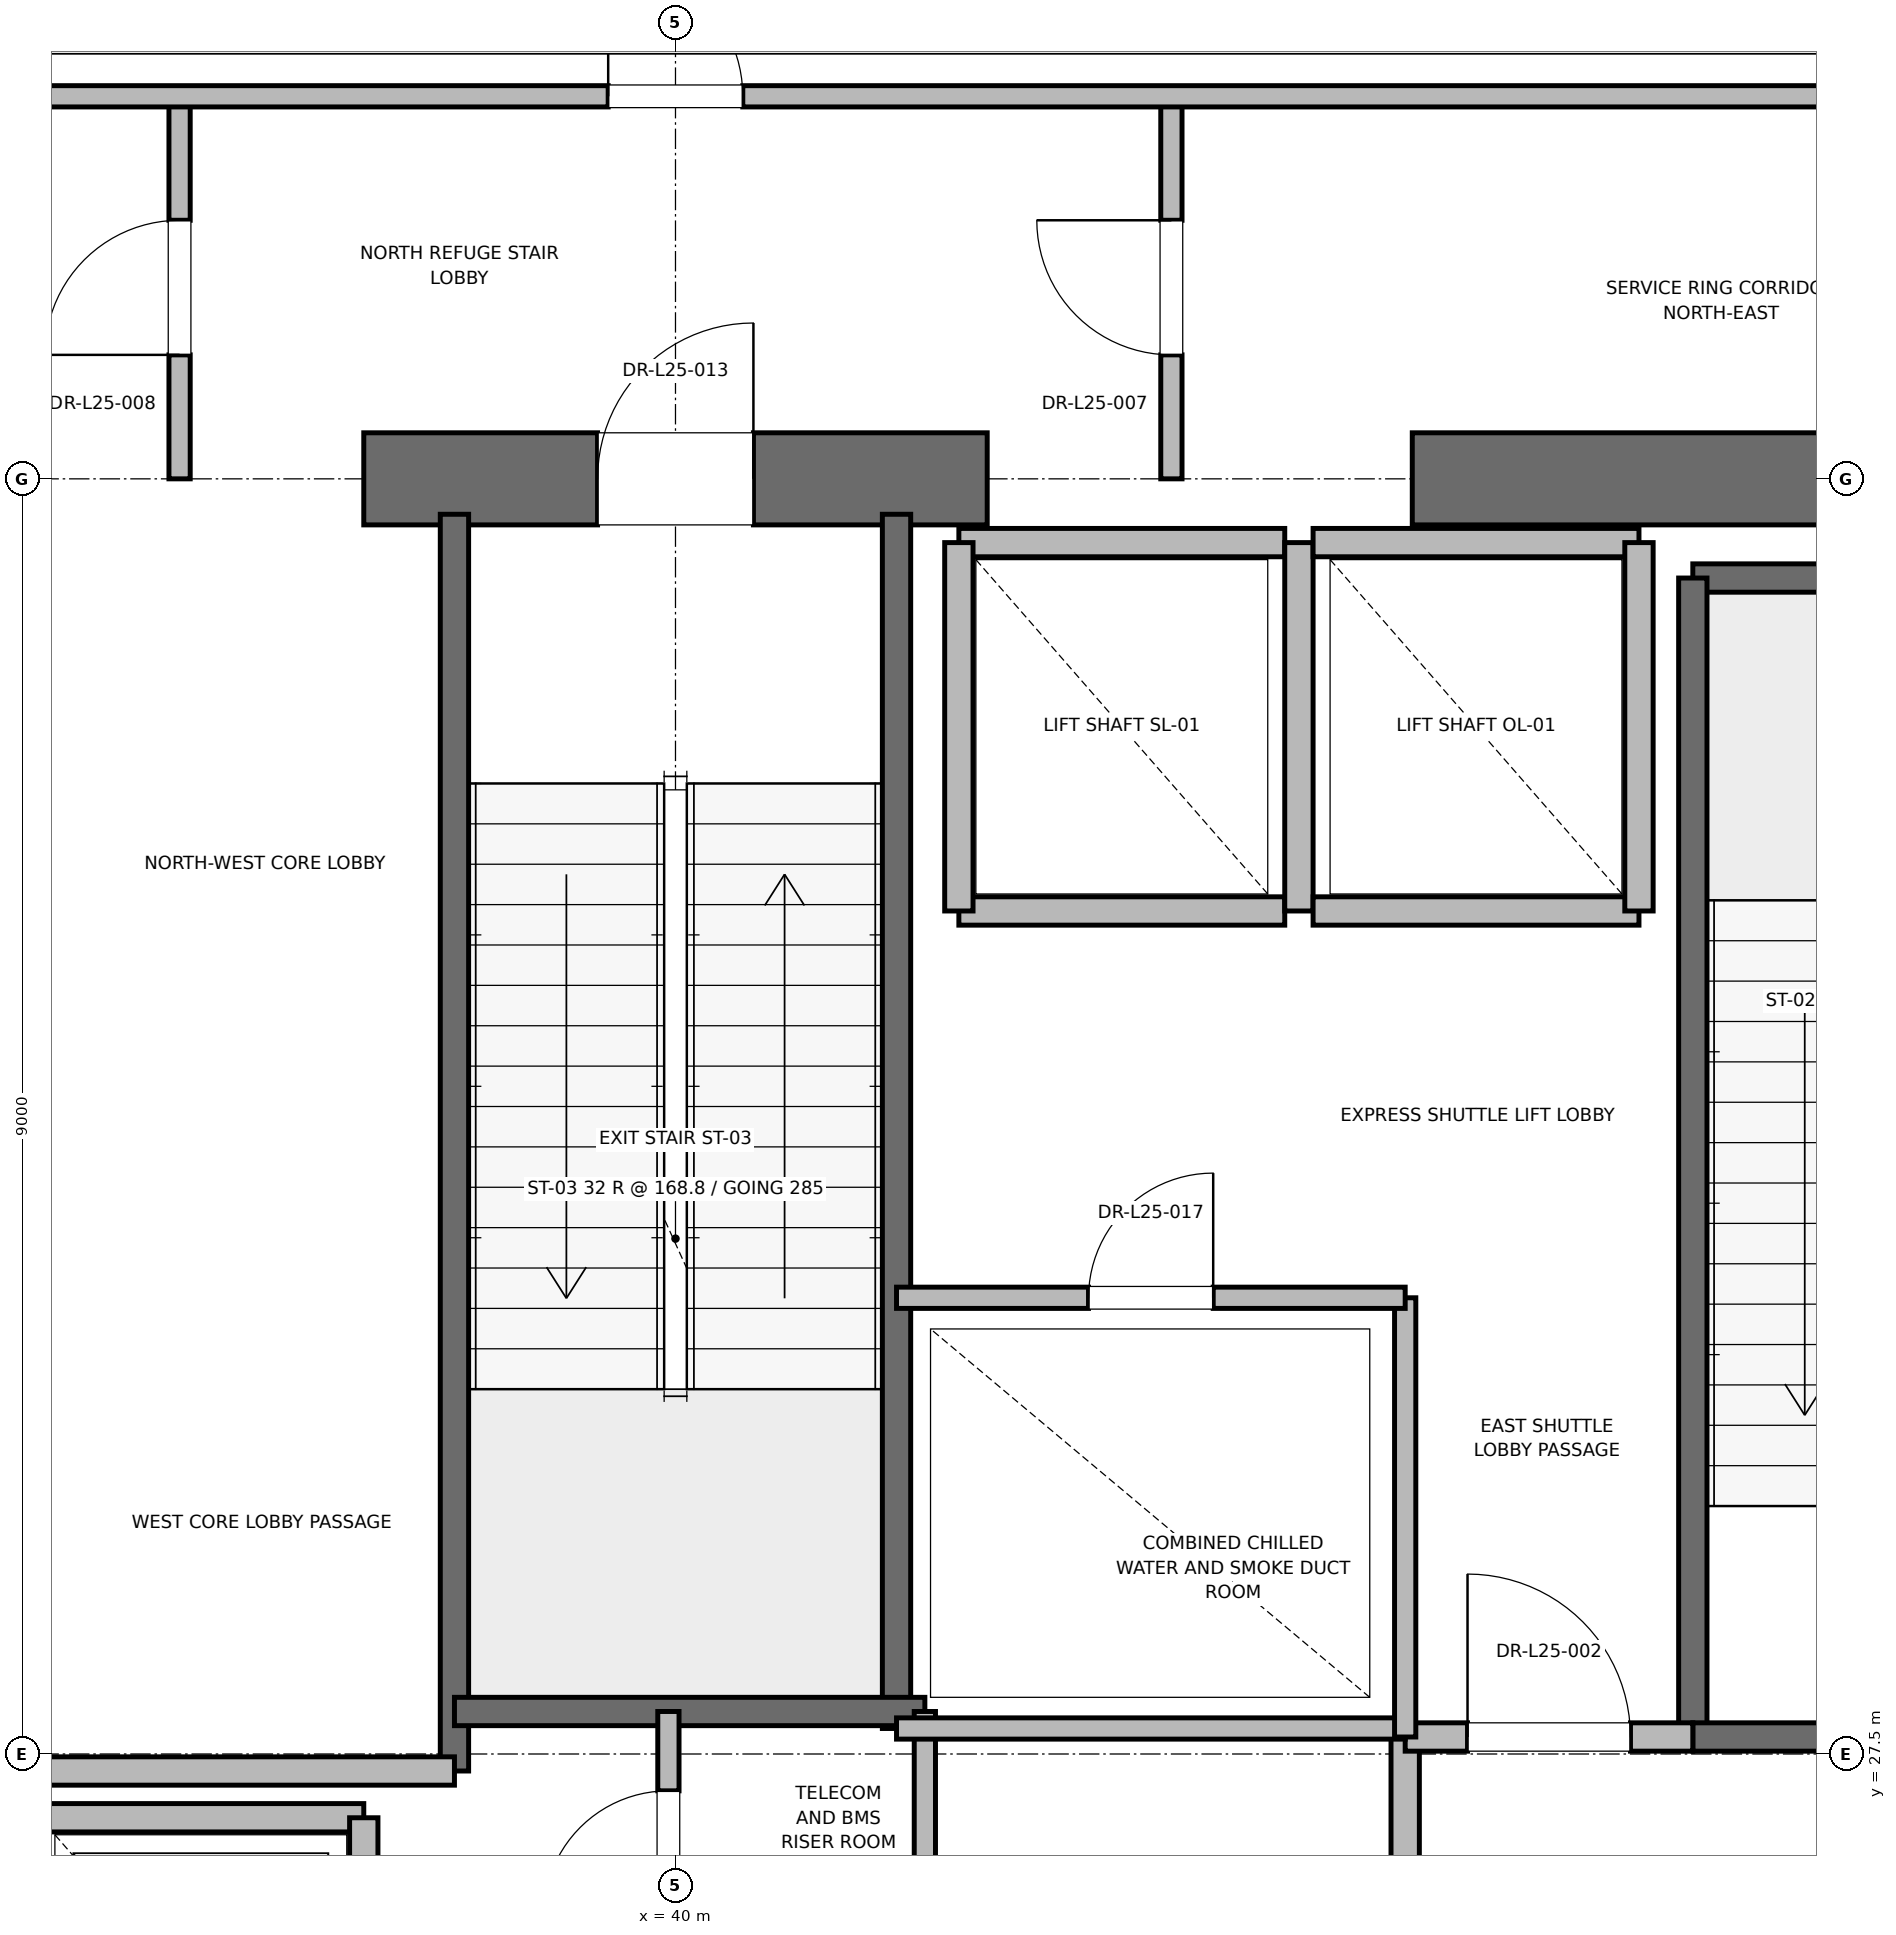
"""IFC4 building model, lengths in metres.
Left out: names, types, materials, properties, quantities, classifications, styles, units other than length and angle.
Written with IfcOpenShell. Run it as: python <this file> out.ifc"""

import sys

from ifc_helpers import new_model, si_unit, direction, frame, frame_2d, origin, place, context, subcontext, project, spatial, rectangle, extrude, element, fill, save


model = new_model("IFC4")
c1 = context("Model", 3, precision=1e-05, world=origin(), true_north=direction((0.0, 1.0)))
c2 = subcontext(c1, "Body", "Model", "MODEL_VIEW")
j1 = project(units=[si_unit("LENGTHUNIT", "METRE"), si_unit("PLANEANGLEUNIT", "RADIAN")], contexts=[c1])
p1 = place(None, origin())
s1 = spatial("IfcSite", under=j1, at=p1, CompositionType="ELEMENT")
p2 = place(p1, origin())
s2 = spatial("IfcBuilding", under=s1, at=p2, CompositionType="ELEMENT")
p3 = place(p2, frame((0.0, 0.0, 107.6)))
s3 = spatial("IfcBuildingStorey", under=s2, at=p3, CompositionType="ELEMENT", Elevation=107.6)
p4 = place(p3, frame((37.8, 36.5, 0.0), z_axis=(0.0, 0.0, 1.0), x_axis=(1.0, 0.0, 0.0)))
e1 = element("IfcWall", 1, at=p4, inside=s3, PredefinedType="SHEAR", context=c2, shape_type="SweptSolid", body=[
    extrude(rectangle(XDim=4.4, YDim=0.65, at=frame_2d((2.2, 0.0))), origin(), (0.0, 0.0, 1.0), 5.1),
])
p5 = place(p4, frame((1.65, 0.0, 0.0)))
e2 = element("IfcOpeningElement", 2, at=p5, cuts=e1, PredefinedType="OPENING", context=c2, shape_type="SweptSolid", body=[
    extrude(rectangle(XDim=1.1, YDim=2.15, at=frame_2d((0.55, 1.075))), frame((0.0, 0.325, 0.0), z_axis=(0.0, -1.0, 0.0), x_axis=(1.0, 0.0, 0.0)), (0.0, 0.0, 1.0), 0.65),
])
p6 = place(p3, frame((45.2, 36.5, 0.0), z_axis=(0.0, 0.0, 1.0), x_axis=(1.0, 0.0, 0.0)))
e3 = element("IfcWall", 3, at=p6, inside=s3, PredefinedType="SHEAR", context=c2, shape_type="SweptSolid", body=[
    extrude(rectangle(XDim=5.8, YDim=0.65, at=frame_2d((2.9, 0.0))), origin(), (0.0, 0.0, 1.0), 5.1),
])
p7 = place(p3, frame((47.18, 35.8, 0.0), z_axis=(0.0, 0.0, 1.0), x_axis=(1.0, 0.0, 0.0)))
e4 = element("IfcWall", 4, at=p7, inside=s3, PredefinedType="SOLIDWALL", context=c2, shape_type="SweptSolid", body=[
    extrude(rectangle(XDim=3.12, YDim=0.2, at=frame_2d((1.56, 0.0))), origin(), (0.0, 0.0, 1.0), 5.1),
])
p8 = place(p3, frame((47.18, 27.62, 0.0), z_axis=(0.0, 0.0, 1.0), x_axis=(0.0, 1.0, 0.0)))
e5 = element("IfcWall", 5, at=p8, inside=s3, PredefinedType="SOLIDWALL", context=c2, shape_type="SweptSolid", body=[
    extrude(rectangle(XDim=8.18, YDim=0.2, at=frame_2d((4.09, 0.0))), origin(), (0.0, 0.0, 1.0), 5.1),
])
p9 = place(p3, frame((47.18, 27.62, 0.0), z_axis=(0.0, 0.0, 1.0), x_axis=(1.0, 0.0, 0.0)))
e6 = element("IfcWall", 6, at=p9, inside=s3, PredefinedType="SOLIDWALL", context=c2, shape_type="SweptSolid", body=[
    extrude(rectangle(XDim=3.12, YDim=0.2, at=frame_2d((1.56, 0.0))), origin(), (0.0, 0.0, 1.0), 5.1),
])
p10 = place(p9, frame((1.01, 0.0, 0.0)))
e7 = element("IfcOpeningElement", 7, at=p10, cuts=e6, PredefinedType="OPENING", context=c2, shape_type="SweptSolid", body=[
    extrude(rectangle(XDim=1.1, YDim=2.15, at=frame_2d((0.55, 1.075))), frame((0.0, 0.1, 0.0), z_axis=(0.0, -1.0, 0.0), x_axis=(1.0, 0.0, 0.0)), (0.0, 0.0, 1.0), 0.2),
])
p11 = place(p3, frame((38.44, 27.38, 0.0), z_axis=(0.0, 0.0, 1.0), x_axis=(0.0, 1.0, 0.0)))
e8 = element("IfcWall", 8, at=p11, inside=s3, PredefinedType="SOLIDWALL", context=c2, shape_type="SweptSolid", body=[
    extrude(rectangle(XDim=8.87, YDim=0.2, at=frame_2d((4.435, 0.0))), origin(), (0.0, 0.0, 1.0), 5.1),
])
p12 = place(p3, frame((41.56, 27.68, 0.0), z_axis=(0.0, 0.0, 1.0), x_axis=(0.0, 1.0, 0.0)))
e9 = element("IfcWall", 9, at=p12, inside=s3, PredefinedType="SOLIDWALL", context=c2, shape_type="SweptSolid", body=[
    extrude(rectangle(XDim=8.57, YDim=0.2, at=frame_2d((4.285, 0.0))), origin(), (0.0, 0.0, 1.0), 5.1),
])
p13 = place(p3, frame((38.44, 27.8, 0.0), z_axis=(0.0, 0.0, 1.0), x_axis=(1.0, 0.0, 0.0)))
e10 = element("IfcWall", 10, at=p13, inside=s3, PredefinedType="SOLIDWALL", context=c2, shape_type="SweptSolid", body=[
    extrude(rectangle(XDim=3.32, YDim=0.2, at=frame_2d((1.66, 0.0))), origin(), (0.0, 0.0, 1.0), 5.1),
])
p14 = place(p3, frame((32.82, 27.38, 0.0), z_axis=(0.0, 0.0, 1.0), x_axis=(1.0, 0.0, 0.0)))
e11 = element("IfcWall", 11, at=p14, inside=s3, PredefinedType="PARTITIONING", context=c2, shape_type="SweptSolid", body=[
    extrude(rectangle(XDim=5.62, YDim=0.2, at=frame_2d((2.81, 0.0))), origin(), (0.0, 0.0, 1.0), 5.1),
])
p15 = place(p3, frame((45.15, 24.25, 0.0), z_axis=(0.0, 0.0, 1.0), x_axis=(0.0, 1.0, 0.0)))
e12 = element("IfcWall", 12, at=p15, inside=s3, PredefinedType="PARTITIONING", context=c2, shape_type="SweptSolid", body=[
    extrude(rectangle(XDim=3.37, YDim=0.2, at=frame_2d((1.685, 0.0))), origin(), (0.0, 0.0, 1.0), 5.1),
])
p16 = place(p3, frame((45.15, 27.62, 0.0), z_axis=(0.0, 0.0, 1.0), x_axis=(1.0, 0.0, 0.0)))
e13 = element("IfcWall", 13, at=p16, inside=s3, PredefinedType="PARTITIONING", context=c2, shape_type="SweptSolid", body=[
    extrude(rectangle(XDim=2.03, YDim=0.2, at=frame_2d((1.015, 0.0))), origin(), (0.0, 0.0, 1.0), 5.1),
])
p17 = place(p16, frame((0.44, 0.0, 0.0)))
e14 = element("IfcOpeningElement", 14, at=p17, cuts=e13, PredefinedType="OPENING", context=c2, shape_type="SweptSolid", body=[
    extrude(rectangle(XDim=1.15, YDim=2.2, at=frame_2d((0.575, 1.1))), frame((0.0, 0.1, 0.0), z_axis=(0.0, -1.0, 0.0), x_axis=(1.0, 0.0, 0.0)), (0.0, 0.0, 1.0), 0.2),
])
p18 = place(p3, frame((37.8, 27.05, 0.0), z_axis=(0.0, 0.0, 1.0), x_axis=(-1.0, 0.0, 0.0)))
e15 = element("IfcWall", 15, at=p18, inside=s3, PredefinedType="SOLIDWALL", context=c2, shape_type="SweptSolid", body=[
    extrude(rectangle(XDim=2.3, YDim=0.2, at=frame_2d((1.15, 0.0))), origin(), (0.0, 0.0, 1.0), 5.1),
])
p19 = place(p3, frame((37.8, 24.45, 0.0), z_axis=(0.0, 0.0, 1.0), x_axis=(0.0, 1.0, 0.0)))
e16 = element("IfcWall", 16, at=p19, inside=s3, PredefinedType="SOLIDWALL", context=c2, shape_type="SweptSolid", body=[
    extrude(rectangle(XDim=2.6, YDim=0.2, at=frame_2d((1.3, 0.0))), origin(), (0.0, 0.0, 1.0), 5.1),
])
p20 = place(p3, frame((42.0, 33.45, 0.0), z_axis=(0.0, 0.0, 1.0), x_axis=(1.0, 0.0, 0.0)))
e17 = element("IfcWall", 17, at=p20, inside=s3, PredefinedType="SOLIDWALL", context=c2, shape_type="SweptSolid", body=[
    extrude(rectangle(XDim=2.3, YDim=0.2, at=frame_2d((1.15, 0.0))), origin(), (0.0, 0.0, 1.0), 5.1),
])
p21 = place(p3, frame((44.3, 36.05, 0.0), z_axis=(0.0, 0.0, 1.0), x_axis=(-1.0, 0.0, 0.0)))
e18 = element("IfcWall", 18, at=p21, inside=s3, PredefinedType="SOLIDWALL", context=c2, shape_type="SweptSolid", body=[
    extrude(rectangle(XDim=2.3, YDim=0.2, at=frame_2d((1.15, 0.0))), origin(), (0.0, 0.0, 1.0), 3.88),
])
for number, where, z_axis, x_axis in (
    (19, (42.0, 36.05, 0.0), (0.0, 0.0, 1.0), (0.0, -1.0, 0.0)),
    (20, (44.4, 33.45, 0.0), (0.0, 0.0, 1.0), (0.0, 1.0, 0.0)),
):
    element("IfcWall", number, at=place(p3, frame(where, z_axis=z_axis, x_axis=x_axis)), inside=s3, PredefinedType="SOLIDWALL", context=c2, shape_type="SweptSolid", body=[
        extrude(rectangle(XDim=2.6, YDim=0.2, at=frame_2d((1.3, 0.0))), origin(), (0.0, 0.0, 1.0), 3.88),
    ])
p22 = place(p3, frame((44.5, 33.45, 0.0), z_axis=(0.0, 0.0, 1.0), x_axis=(1.0, 0.0, 0.0)))
e21 = element("IfcWall", 21, at=p22, inside=s3, PredefinedType="SOLIDWALL", context=c2, shape_type="SweptSolid", body=[
    extrude(rectangle(XDim=2.3, YDim=0.2, at=frame_2d((1.15, 0.0))), origin(), (0.0, 0.0, 1.0), 5.1),
])
p23 = place(p3, frame((46.8, 36.05, 0.0), z_axis=(0.0, 0.0, 1.0), x_axis=(-1.0, 0.0, 0.0)))
e22 = element("IfcWall", 22, at=p23, inside=s3, PredefinedType="SOLIDWALL", context=c2, shape_type="SweptSolid", body=[
    extrude(rectangle(XDim=2.3, YDim=0.2, at=frame_2d((1.15, 0.0))), origin(), (0.0, 0.0, 1.0), 3.88),
])
p24 = place(p3, frame((46.8, 33.45, 0.0), z_axis=(0.0, 0.0, 1.0), x_axis=(0.0, 1.0, 0.0)))
e23 = element("IfcWall", 23, at=p24, inside=s3, PredefinedType="SOLIDWALL", context=c2, shape_type="SweptSolid", body=[
    extrude(rectangle(XDim=2.6, YDim=0.2, at=frame_2d((1.3, 0.0))), origin(), (0.0, 0.0, 1.0), 5.1),
])
p25 = place(p3, frame((41.76, 23.8, 0.0), z_axis=(0.0, 0.0, 1.0), x_axis=(0.0, 1.0, 0.0)))
e24 = element("IfcWall", 24, at=p25, inside=s3, PredefinedType="PARTITIONING", context=c2, shape_type="SweptSolid", body=[
    extrude(rectangle(XDim=4.0, YDim=0.15, at=frame_2d((2.0, 0.0))), origin(), (0.0, 0.0, 1.0), 2.85),
])
p26 = place(p3, frame((39.95, 25.8, 0.0), z_axis=(0.0, 0.0, 1.0), x_axis=(0.0, 1.0, 0.0)))
e25 = element("IfcWall", 25, at=p26, inside=s3, PredefinedType="PARTITIONING", context=c2, shape_type="SweptSolid", body=[
    extrude(rectangle(XDim=2.0, YDim=0.15, at=frame_2d((1.0, 0.0))), origin(), (0.0, 0.0, 1.0), 2.85),
])
p27 = place(p26, frame((0.56, 0.0, 0.0)))
e26 = element("IfcOpeningElement", 26, at=p27, cuts=e25, PredefinedType="OPENING", context=c2, shape_type="SweptSolid", body=[
    extrude(rectangle(XDim=0.88, YDim=2.1, at=frame_2d((0.44, 1.05))), frame((0.0, 0.075, 0.0), z_axis=(0.0, -1.0, 0.0), x_axis=(1.0, 0.0, 0.0)), (0.0, 0.0, 1.0), 0.15),
])
p28 = place(p3, frame((41.56, 27.68, 0.0), z_axis=(0.0, 0.0, 1.0), x_axis=(1.0, 0.0, 0.0)))
e27 = element("IfcWall", 27, at=p28, inside=s3, PredefinedType="PARTITIONING", context=c2, shape_type="SweptSolid", body=[
    extrude(rectangle(XDim=3.59, YDim=0.15, at=frame_2d((1.795, 0.0))), origin(), (0.0, 0.0, 1.0), 2.85),
])
p29 = place(p3, frame((45.15, 27.62, 0.0), z_axis=(0.0, 0.0, 1.0), x_axis=(0.0, 1.0, 0.0)))
e28 = element("IfcWall", 28, at=p29, inside=s3, PredefinedType="PARTITIONING", context=c2, shape_type="SweptSolid", body=[
    extrude(rectangle(XDim=3.1, YDim=0.15, at=frame_2d((1.55, 0.0))), origin(), (0.0, 0.0, 1.0), 2.85),
])
p30 = place(p3, frame((41.56, 30.72, 0.0), z_axis=(0.0, 0.0, 1.0), x_axis=(1.0, 0.0, 0.0)))
e29 = element("IfcWall", 29, at=p30, inside=s3, PredefinedType="PARTITIONING", context=c2, shape_type="SweptSolid", body=[
    extrude(rectangle(XDim=3.59, YDim=0.15, at=frame_2d((1.795, 0.0))), origin(), (0.0, 0.0, 1.0), 2.85),
])
p31 = place(p30, frame((1.355, 0.0, 0.0)))
e30 = element("IfcOpeningElement", 30, at=p31, cuts=e29, PredefinedType="OPENING", context=c2, shape_type="SweptSolid", body=[
    extrude(rectangle(XDim=0.88, YDim=2.1, at=frame_2d((0.44, 1.05))), frame((0.0, 0.075, 0.0), z_axis=(0.0, -1.0, 0.0), x_axis=(1.0, 0.0, 0.0)), (0.0, 0.0, 1.0), 0.15),
])
p32 = place(p3, frame((36.5, 36.5, 0.0), z_axis=(0.0, 0.0, 1.0), x_axis=(0.0, 1.0, 0.0)))
e31 = element("IfcWall", 31, at=p32, inside=s3, PredefinedType="PARTITIONING", context=c2, shape_type="SweptSolid", body=[
    extrude(rectangle(XDim=2.7, YDim=0.15, at=frame_2d((1.35, 0.0))), origin(), (0.0, 0.0, 1.0), 2.85),
])
p33 = place(p32, frame((0.875, 0.0, 0.0)))
e32 = element("IfcOpeningElement", 32, at=p33, cuts=e31, PredefinedType="OPENING", context=c2, shape_type="SweptSolid", body=[
    extrude(rectangle(XDim=0.95, YDim=2.15, at=frame_2d((0.475, 1.075))), frame((0.0, 0.075, 0.0), z_axis=(0.0, -1.0, 0.0), x_axis=(1.0, 0.0, 0.0)), (0.0, 0.0, 1.0), 0.15),
])
p34 = place(p3, frame((43.5, 36.5, 0.0), z_axis=(0.0, 0.0, 1.0), x_axis=(0.0, 1.0, 0.0)))
e33 = element("IfcWall", 33, at=p34, inside=s3, PredefinedType="PARTITIONING", context=c2, shape_type="SweptSolid", body=[
    extrude(rectangle(XDim=2.7, YDim=0.15, at=frame_2d((1.35, 0.0))), origin(), (0.0, 0.0, 1.0), 2.85),
])
p35 = place(p34, frame((0.875, 0.0, 0.0)))
e34 = element("IfcOpeningElement", 34, at=p35, cuts=e33, PredefinedType="OPENING", context=c2, shape_type="SweptSolid", body=[
    extrude(rectangle(XDim=0.95, YDim=2.15, at=frame_2d((0.475, 1.075))), frame((0.0, 0.075, 0.0), z_axis=(0.0, -1.0, 0.0), x_axis=(1.0, 0.0, 0.0)), (0.0, 0.0, 1.0), 0.15),
])
p36 = place(p3, frame((29.25, 39.2, 0.0), z_axis=(0.0, 0.0, 1.0), x_axis=(1.0, 0.0, 0.0)))
e35 = element("IfcWall", 35, at=p36, inside=s3, PredefinedType="PARTITIONING", context=c2, shape_type="SweptSolid", body=[
    extrude(rectangle(XDim=21.5, YDim=0.15, at=frame_2d((10.75, 0.0))), origin(), (0.0, 0.0, 1.0), 2.85),
])
p37 = place(p36, frame((10.275, 0.0, 0.0)))
e36 = element("IfcOpeningElement", 36, at=p37, cuts=e35, PredefinedType="OPENING", context=c2, shape_type="SweptSolid", body=[
    extrude(rectangle(XDim=0.95, YDim=2.15, at=frame_2d((0.475, 1.075))), frame((0.0, 0.075, 0.0), z_axis=(0.0, -1.0, 0.0), x_axis=(1.0, 0.0, 0.0)), (0.0, 0.0, 1.0), 0.15),
])
p38 = place(p5, origin())
e37 = element("IfcDoor", 37, at=p38, inside=s3, OperationType="SINGLE_SWING_RIGHT", PredefinedType="DOOR", context=c2, shape_type="SweptSolid", body=[
    extrude(rectangle(XDim=1.1, YDim=2.15, at=frame_2d((0.55, 1.075))), frame((0.0, 0.025, 0.0), z_axis=(0.0, -1.0, 0.0), x_axis=(1.0, 0.0, 0.0)), (0.0, 0.0, 1.0), 0.05),
])
fill(e2, e37)
p39 = place(p17, origin())
e38 = element("IfcDoor", 38, at=p39, inside=s3, OperationType="SINGLE_SWING_LEFT", PredefinedType="DOOR", context=c2, shape_type="SweptSolid", body=[
    extrude(rectangle(XDim=1.15, YDim=2.2, at=frame_2d((0.575, 1.1))), frame((0.0, 0.025, 0.0), z_axis=(0.0, -1.0, 0.0), x_axis=(1.0, 0.0, 0.0)), (0.0, 0.0, 1.0), 0.05),
])
fill(e14, e38)
p40 = place(p27, origin())
e39 = element("IfcDoor", 39, at=p40, inside=s3, OperationType="SINGLE_SWING_LEFT", PredefinedType="DOOR", context=c2, shape_type="SweptSolid", body=[
    extrude(rectangle(XDim=0.88, YDim=2.1, at=frame_2d((0.44, 1.05))), frame((0.0, 0.025, 0.0), z_axis=(0.0, -1.0, 0.0), x_axis=(1.0, 0.0, 0.0)), (0.0, 0.0, 1.0), 0.05),
])
fill(e26, e39)
p41 = place(p31, origin())
e40 = element("IfcDoor", 40, at=p41, inside=s3, OperationType="SINGLE_SWING_RIGHT", PredefinedType="DOOR", context=c2, shape_type="SweptSolid", body=[
    extrude(rectangle(XDim=0.88, YDim=2.1, at=frame_2d((0.44, 1.05))), frame((0.0, 0.025, 0.0), z_axis=(0.0, -1.0, 0.0), x_axis=(1.0, 0.0, 0.0)), (0.0, 0.0, 1.0), 0.05),
])
fill(e30, e40)
p42 = place(p33, origin())
e41 = element("IfcDoor", 41, at=p42, inside=s3, OperationType="SINGLE_SWING_LEFT", PredefinedType="DOOR", context=c2, shape_type="SweptSolid", body=[
    extrude(rectangle(XDim=0.95, YDim=2.15, at=frame_2d((0.475, 1.075))), frame((0.0, 0.025, 0.0), z_axis=(0.0, -1.0, 0.0), x_axis=(1.0, 0.0, 0.0)), (0.0, 0.0, 1.0), 0.05),
])
fill(e32, e41)
p43 = place(p35, origin())
e42 = element("IfcDoor", 42, at=p43, inside=s3, OperationType="SINGLE_SWING_RIGHT", PredefinedType="DOOR", context=c2, shape_type="SweptSolid", body=[
    extrude(rectangle(XDim=0.95, YDim=2.15, at=frame_2d((0.475, 1.075))), frame((0.0, 0.025, 0.0), z_axis=(0.0, -1.0, 0.0), x_axis=(1.0, 0.0, 0.0)), (0.0, 0.0, 1.0), 0.05),
])
fill(e34, e42)
p44 = place(p37, origin())
e43 = element("IfcDoor", 43, at=p44, inside=s3, OperationType="SINGLE_SWING_LEFT", PredefinedType="DOOR", context=c2, shape_type="SweptSolid", body=[
    extrude(rectangle(XDim=0.95, YDim=2.15, at=frame_2d((0.475, 1.075))), frame((0.0, 0.025, 0.0), z_axis=(0.0, -1.0, 0.0), x_axis=(1.0, 0.0, 0.0)), (0.0, 0.0, 1.0), 0.05),
])
fill(e36, e43)
save(model, sys.argv[1])
